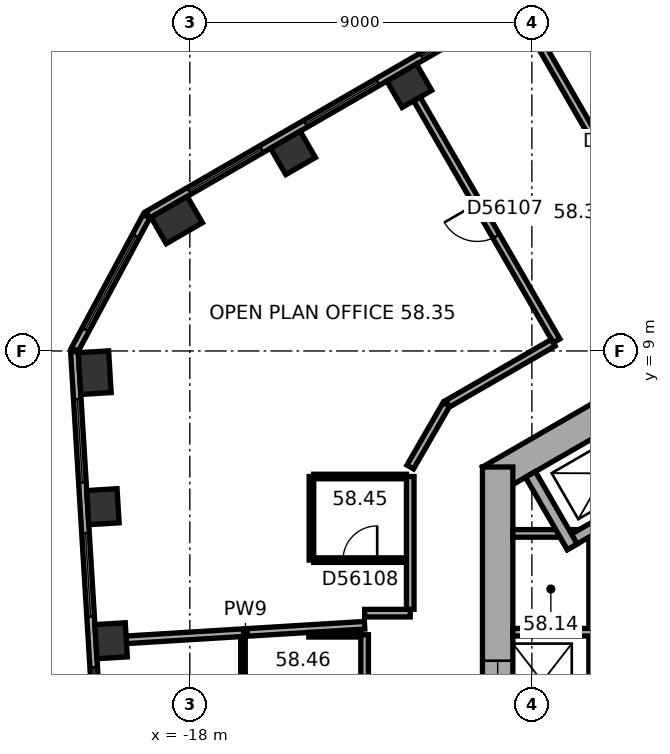
"""IFC4 building model, lengths in metres.
Left out: names, types, materials, properties, quantities, classifications, styles, units other than length and angle.
Written with IfcOpenShell. Run it as: python <this file> out.ifc"""

import sys

from ifc_helpers import new_model, si_unit, direction, frame, frame_2d, origin, origin_2d, place, context, subcontext, project, spatial, rectangle, extrude, element, fill, save


model = new_model("IFC4")
c1 = context("Model", 3, precision=1e-05, world=origin(), true_north=direction((0.0, 1.0)))
c2 = subcontext(c1, "Body", "Model", "MODEL_VIEW")
j1 = project(units=[si_unit("LENGTHUNIT", "METRE"), si_unit("PLANEANGLEUNIT", "RADIAN")], contexts=[c1])
p1 = place(None, origin())
s1 = spatial("IfcSite", under=j1, at=p1, CompositionType="ELEMENT")
p2 = place(p1, origin())
s2 = spatial("IfcBuilding", under=s1, at=p2, CompositionType="ELEMENT")
p3 = place(p2, frame((0.0, 0.0, 236.5)))
s3 = spatial("IfcBuildingStorey", under=s2, at=p3, CompositionType="ELEMENT", Elevation=236.5)
for number, where, z_axis, x_axis in (
    (1, (-12.225, 15.978, 0.0), (0.0, 0.0, 1.0), (-0.866, -0.5, 0.0)),
    (2, (-15.285, 14.211, 0.0), (0.0, 0.0, 1.0), (-0.866, -0.5, 0.0)),
):
    element("IfcColumn", number, at=place(p3, frame(where, z_axis=z_axis, x_axis=x_axis)), inside=s3, PredefinedType="COLUMN", context=c2, shape_type="SweptSolid", body=[
        extrude(rectangle(XDim=0.9, YDim=0.8, at=origin_2d()), origin(), (0.0, 0.0, 1.0), 3.7),
    ])
for number, where, z_axis, x_axis in (
    (3, (-18.345, 12.445, 0.0), (0.0, 0.0, 1.0), (-0.866, -0.5, 0.0)),
    (4, (-20.503, 8.429, 0.0), (0.0, 0.0, 1.0), (0.061, -0.998, 0.0)),
):
    element("IfcColumn", number, at=place(p3, frame(where, z_axis=z_axis, x_axis=x_axis)), inside=s3, PredefinedType="COLUMN", context=c2, shape_type="SweptSolid", body=[
        extrude(rectangle(XDim=1.1, YDim=0.8, at=origin_2d()), origin(), (0.0, 0.0, 1.0), 3.7),
    ])
for number, where, z_axis, x_axis in (
    (5, (-20.287, 4.902, 0.0), (0.0, 0.0, 1.0), (0.061, -0.998, 0.0)),
    (6, (-20.071, 1.375, 0.0), (0.0, 0.0, 1.0), (0.061, -0.998, 0.0)),
):
    element("IfcColumn", number, at=place(p3, frame(where, z_axis=z_axis, x_axis=x_axis)), inside=s3, PredefinedType="COLUMN", context=c2, shape_type="SweptSolid", body=[
        extrude(rectangle(XDim=0.9, YDim=0.8, at=origin_2d()), origin(), (0.0, 0.0, 1.0), 3.7),
    ])
p4 = place(p3, frame((0.2, 11.547, 0.0), z_axis=(0.0, 0.0, 1.0), x_axis=(-0.866023897231, -0.500002609418, 0.0)))
e7 = element("IfcWall", 7, at=p4, inside=s3, PredefinedType="SHEAR", context=c2, shape_type="SweptSolid", body=[
    extrude(rectangle(XDim=11.894, YDim=0.8, at=frame_2d((5.947, 0.0))), origin(), (0.0, 0.0, 1.0), 3.7),
])
p5 = place(p4, frame((6.147, 0.0, 0.0)))
e8 = element("IfcOpeningElement", 8, at=p5, cuts=e7, PredefinedType="OPENING", context=c2, shape_type="SweptSolid", body=[
    extrude(rectangle(XDim=1.5, YDim=2.1, at=frame_2d((0.75, 1.05))), frame((0.0, 0.41, 0.0), z_axis=(0.0, -1.0, 0.0), x_axis=(1.0, 0.0, 0.0)), (0.0, 0.0, 1.0), 0.82),
])
p6 = place(p4, frame((2.997, 0.0, 0.0)))
e9 = element("IfcOpeningElement", 9, at=p6, cuts=e7, PredefinedType="OPENING", context=c2, shape_type="SweptSolid", body=[
    extrude(rectangle(XDim=0.9, YDim=2.1, at=frame_2d((0.45, 1.05))), frame((0.0, 0.41, 0.0), z_axis=(0.0, -1.0, 0.0), x_axis=(1.0, 0.0, 0.0)), (0.0, 0.0, 1.0), 0.82),
])
p7 = place(p3, frame((-9.9, 5.947, 0.0), z_axis=(0.0, 0.0, 1.0), x_axis=(0.0, -1.0, 0.0)))
e10 = element("IfcWall", 10, at=p7, inside=s3, PredefinedType="SHEAR", context=c2, shape_type="SweptSolid", body=[
    extrude(rectangle(XDim=11.894, YDim=0.8, at=frame_2d((5.947, 0.0))), origin(), (0.0, 0.0, 1.0), 3.7),
])
p8 = place(p7, frame((5.097, 0.0, 0.0)))
e11 = element("IfcOpeningElement", 11, at=p8, cuts=e10, PredefinedType="OPENING", context=c2, shape_type="SweptSolid", body=[
    extrude(rectangle(XDim=1.1, YDim=2.1, at=frame_2d((0.55, 1.05))), frame((0.0, 0.41, 0.0), z_axis=(0.0, -1.0, 0.0), x_axis=(1.0, 0.0, 0.0)), (0.0, 0.0, 1.0), 0.82),
])
p9 = place(p7, frame((7.697, 0.0, 0.0)))
e12 = element("IfcOpeningElement", 12, at=p9, cuts=e10, PredefinedType="OPENING", context=c2, shape_type="SweptSolid", body=[
    extrude(rectangle(XDim=1.1, YDim=2.1, at=frame_2d((0.55, 1.05))), frame((0.0, 0.41, 0.0), z_axis=(0.0, -1.0, 0.0), x_axis=(1.0, 0.0, 0.0)), (0.0, 0.0, 1.0), 0.82),
])
p10 = place(p3, frame((-2.786, 22.005, 0.0), z_axis=(0.0, 0.0, 1.0), x_axis=(-0.866026555358, -0.49999800541, 0.0)))
e13 = element("IfcWall", 13, at=p10, inside=s3, PredefinedType="STANDARD", context=c2, shape_type="SweptSolid", body=[
    extrude(rectangle(XDim=18.841, YDim=0.2, at=frame_2d((9.421, 0.0))), origin(), (0.0, 0.0, 1.0), 3.7),
])
p11 = place(p10, frame((1.254, 0.0, 0.9)))
e14 = element("IfcOpeningElement", 14, at=p11, cuts=e13, PredefinedType="OPENING", context=c2, shape_type="SweptSolid", body=[
    extrude(rectangle(XDim=2.2, YDim=2.0, at=frame_2d((1.1, 1.0))), frame((0.0, 0.11, 0.0), z_axis=(0.0, -1.0, 0.0), x_axis=(1.0, 0.0, 0.0)), (0.0, 0.0, 1.0), 0.22),
])
p12 = place(p10, frame((4.788, 0.0, 0.9)))
e15 = element("IfcOpeningElement", 15, at=p12, cuts=e13, PredefinedType="OPENING", context=c2, shape_type="SweptSolid", body=[
    extrude(rectangle(XDim=2.2, YDim=2.0, at=frame_2d((1.1, 1.0))), frame((0.0, 0.11, 0.0), z_axis=(0.0, -1.0, 0.0), x_axis=(1.0, 0.0, 0.0)), (0.0, 0.0, 1.0), 0.22),
])
p13 = place(p10, frame((8.321, 0.0, 0.9)))
e16 = element("IfcOpeningElement", 16, at=p13, cuts=e13, PredefinedType="OPENING", context=c2, shape_type="SweptSolid", body=[
    extrude(rectangle(XDim=2.2, YDim=2.0, at=frame_2d((1.1, 1.0))), frame((0.0, 0.11, 0.0), z_axis=(0.0, -1.0, 0.0), x_axis=(1.0, 0.0, 0.0)), (0.0, 0.0, 1.0), 0.22),
])
p14 = place(p10, frame((11.855, 0.0, 0.9)))
e17 = element("IfcOpeningElement", 17, at=p14, cuts=e13, PredefinedType="OPENING", context=c2, shape_type="SweptSolid", body=[
    extrude(rectangle(XDim=2.2, YDim=2.0, at=frame_2d((1.1, 1.0))), frame((0.0, 0.11, 0.0), z_axis=(0.0, -1.0, 0.0), x_axis=(1.0, 0.0, 0.0)), (0.0, 0.0, 1.0), 0.22),
])
p15 = place(p10, frame((15.389, 0.0, 0.9)))
e18 = element("IfcOpeningElement", 18, at=p15, cuts=e13, PredefinedType="OPENING", context=c2, shape_type="SweptSolid", body=[
    extrude(rectangle(XDim=2.2, YDim=2.0, at=frame_2d((1.1, 1.0))), frame((0.0, 0.11, 0.0), z_axis=(0.0, -1.0, 0.0), x_axis=(1.0, 0.0, 0.0)), (0.0, 0.0, 1.0), 0.22),
])
p16 = place(p3, frame((-19.141, 12.545, 0.0), z_axis=(0.0, 0.0, 1.0), x_axis=(-0.473306370921, -0.880897882416, 0.0)))
e19 = element("IfcWall", 19, at=p16, inside=s3, PredefinedType="STANDARD", context=c2, shape_type="SweptSolid", body=[
    extrude(rectangle(XDim=3.983, YDim=0.2, at=frame_2d((1.991, 0.0))), origin(), (0.0, 0.0, 1.0), 3.7),
])
p17 = place(p16, frame((0.591, 0.0, 0.9)))
e20 = element("IfcOpeningElement", 20, at=p17, cuts=e19, PredefinedType="OPENING", context=c2, shape_type="SweptSolid", body=[
    extrude(rectangle(XDim=2.8, YDim=2.0, at=frame_2d((1.4, 1.0))), frame((0.0, 0.11, 0.0), z_axis=(0.0, -1.0, 0.0), x_axis=(1.0, 0.0, 0.0)), (0.0, 0.0, 1.0), 0.22),
])
p18 = place(p3, frame((-21.038, 8.984, 0.0), z_axis=(0.0, 0.0, 1.0), x_axis=(0.061043935634, -0.998135079998, 0.0)))
e21 = element("IfcWall", 21, at=p18, inside=s3, PredefinedType="STANDARD", context=c2, shape_type="SweptSolid", body=[
    extrude(rectangle(XDim=18.841, YDim=0.2, at=frame_2d((9.421, 0.0))), origin(), (0.0, 0.0, 1.0), 3.7),
])
p19 = place(p18, frame((1.253, 0.0, 0.9)))
e22 = element("IfcOpeningElement", 22, at=p19, cuts=e21, PredefinedType="OPENING", context=c2, shape_type="SweptSolid", body=[
    extrude(rectangle(XDim=2.2, YDim=2.0, at=frame_2d((1.1, 1.0))), frame((0.0, 0.11, 0.0), z_axis=(0.0, -1.0, 0.0), x_axis=(1.0, 0.0, 0.0)), (0.0, 0.0, 1.0), 0.22),
])
p20 = place(p18, frame((4.786, 0.0, 0.9)))
e23 = element("IfcOpeningElement", 23, at=p20, cuts=e21, PredefinedType="OPENING", context=c2, shape_type="SweptSolid", body=[
    extrude(rectangle(XDim=2.2, YDim=2.0, at=frame_2d((1.1, 1.0))), frame((0.0, 0.11, 0.0), z_axis=(0.0, -1.0, 0.0), x_axis=(1.0, 0.0, 0.0)), (0.0, 0.0, 1.0), 0.22),
])
p21 = place(p18, frame((8.32, 0.0, 0.9)))
e24 = element("IfcOpeningElement", 24, at=p21, cuts=e21, PredefinedType="OPENING", context=c2, shape_type="SweptSolid", body=[
    extrude(rectangle(XDim=2.2, YDim=2.0, at=frame_2d((1.1, 1.0))), frame((0.0, 0.11, 0.0), z_axis=(0.0, -1.0, 0.0), x_axis=(1.0, 0.0, 0.0)), (0.0, 0.0, 1.0), 0.22),
])
p22 = place(p18, frame((11.854, 0.0, 0.9)))
e25 = element("IfcOpeningElement", 25, at=p22, cuts=e21, PredefinedType="OPENING", context=c2, shape_type="SweptSolid", body=[
    extrude(rectangle(XDim=2.2, YDim=2.0, at=frame_2d((1.1, 1.0))), frame((0.0, 0.11, 0.0), z_axis=(0.0, -1.0, 0.0), x_axis=(1.0, 0.0, 0.0)), (0.0, 0.0, 1.0), 0.22),
])
p23 = place(p18, frame((15.387, 0.0, 0.9)))
e26 = element("IfcOpeningElement", 26, at=p23, cuts=e21, PredefinedType="OPENING", context=c2, shape_type="SweptSolid", body=[
    extrude(rectangle(XDim=2.2, YDim=2.0, at=frame_2d((1.1, 1.0))), frame((0.0, 0.11, 0.0), z_axis=(0.0, -1.0, 0.0), x_axis=(1.0, 0.0, 0.0)), (0.0, 0.0, 1.0), 0.22),
])
p24 = place(p3, frame((-7.4, 4.3, 0.0), z_axis=(0.0, 0.0, 1.0), x_axis=(0.0, -1.0, 0.0)))
e27 = element("IfcWall", 27, at=p24, inside=s3, PredefinedType="PARTITIONING", context=c2, shape_type="SweptSolid", body=[
    extrude(rectangle(XDim=8.0, YDim=0.2, at=frame_2d((4.0, 0.0))), origin(), (0.0, 0.0, 1.0), 3.42),
])
for number, where, z_axis, x_axis in (
    (28, (-7.3, 4.2, 0.0), (0.0, 0.0, 1.0), (-1.0, 0.0, 0.0)),
    (29, (-7.3, 1.6, 0.0), (0.0, 0.0, 1.0), (-1.0, 0.0, 0.0)),
):
    element("IfcWall", number, at=place(p3, frame(where, z_axis=z_axis, x_axis=x_axis)), inside=s3, PredefinedType="PARTITIONING", context=c2, shape_type="SweptSolid", body=[
        extrude(rectangle(XDim=2.2, YDim=0.2, at=frame_2d((1.1, 0.0))), origin(), (0.0, 0.0, 1.0), 3.42),
    ])
p25 = place(p3, frame((-5.24, 5.577, 0.0), z_axis=(0.0, 0.0, 1.0), x_axis=(-0.866014461049, -0.500018952895, 0.0)))
e30 = element("IfcWall", 30, at=p25, inside=s3, PredefinedType="SHEAR", context=c2, shape_type="SweptSolid", body=[
    extrude(rectangle(XDim=3.35, YDim=0.3, at=frame_2d((1.675, 0.0))), origin(), (0.0, 0.0, 1.0), 3.42),
])
p26 = place(p3, frame((-7.937, 3.847, 0.0), z_axis=(0.0, 0.0, 1.0), x_axis=(-0.50002983664, 0.866008176907, 0.0)))
e31 = element("IfcWall", 31, at=p26, inside=s3, PredefinedType="SHEAR", context=c2, shape_type="SweptSolid", body=[
    extrude(rectangle(XDim=2.2, YDim=0.3, at=frame_2d((1.1, 0.0))), origin(), (0.0, 0.0, 1.0), 3.42),
])
p27 = place(p3, frame((-19.672, 1.4, 0.0), z_axis=(0.0, 0.0, 1.0), x_axis=(0.99813499784, 0.061045278997, 0.0)))
e32 = element("IfcWall", 32, at=p27, inside=s3, PredefinedType="PARTITIONING", context=c2, shape_type="SweptSolid", body=[
    extrude(rectangle(XDim=6.283, YDim=0.2, at=frame_2d((3.142, 0.0))), origin(), (0.0, 0.0, 1.0), 2.87),
])
p28 = place(p3, frame((-16.601, -1.267, 0.0), z_axis=(0.0, 0.0, 1.0), x_axis=(0.0, 1.0, 0.0)))
e33 = element("IfcWall", 33, at=p28, inside=s3, PredefinedType="PARTITIONING", context=c2, shape_type="SweptSolid", body=[
    extrude(rectangle(XDim=2.75, YDim=0.12, at=frame_2d((1.375, 0.0))), origin(), (0.0, 0.0, 1.0), 3.42),
])
p29 = place(p3, frame((-14.869, 1.533, 0.0), z_axis=(0.0, 0.0, 1.0), x_axis=(1.0, 0.0, 0.0)))
e34 = element("IfcWall", 34, at=p29, inside=s3, PredefinedType="PARTITIONING", context=c2, shape_type="SweptSolid", body=[
    extrude(rectangle(XDim=1.368, YDim=0.12, at=frame_2d((0.684, 0.0))), origin(), (0.0, 0.0, 1.0), 3.42),
])
p30 = place(p3, frame((-14.8, 3.497, 0.0), z_axis=(0.0, 0.0, 1.0), x_axis=(0.0, 1.0, 0.0)))
e35 = element("IfcWall", 35, at=p30, inside=s3, PredefinedType="PARTITIONING", context=c2, shape_type="SweptSolid", body=[
    extrude(rectangle(XDim=2.2, YDim=0.12, at=frame_2d((1.1, 0.0))), origin(), (0.0, 0.0, 1.0), 3.42),
])
p31 = place(p3, frame((-14.74, 5.697, 0.0), z_axis=(0.0, 0.0, 1.0), x_axis=(1.0, 0.0, 0.0)))
e36 = element("IfcWall", 36, at=p31, inside=s3, PredefinedType="PARTITIONING", context=c2, shape_type="SweptSolid", body=[
    extrude(rectangle(XDim=2.44, YDim=0.12, at=frame_2d((1.22, 0.0))), origin(), (0.0, 0.0, 1.0), 3.42),
])
p32 = place(p3, frame((-13.401, 1.533, 0.0), z_axis=(0.0, 0.0, 1.0), x_axis=(0.0, -1.0, 0.0)))
e37 = element("IfcWall", 37, at=p32, inside=s3, PredefinedType="PARTITIONING", context=c2, shape_type="SweptSolid", body=[
    extrude(rectangle(XDim=5.534, YDim=0.2, at=frame_2d((2.767, 0.0))), origin(), (0.0, 0.0, 1.0), 3.42),
])
p33 = place(p32, frame((3.692, 0.0, 0.0)))
e38 = element("IfcOpeningElement", 38, at=p33, cuts=e37, PredefinedType="OPENING", context=c2, shape_type="SweptSolid", body=[
    extrude(rectangle(XDim=1.0, YDim=2.1, at=frame_2d((0.5, 1.05))), frame((0.0, 0.11, 0.0), z_axis=(0.0, -1.0, 0.0), x_axis=(1.0, 0.0, 0.0)), (0.0, 0.0, 1.0), 0.22),
])
p34 = place(p3, frame((-12.3, 3.497, 0.0), z_axis=(0.0, 0.0, 1.0), x_axis=(-1.0, 0.0, 0.0)))
e39 = element("IfcWall", 39, at=p34, inside=s3, PredefinedType="PARTITIONING", context=c2, shape_type="SweptSolid", body=[
    extrude(rectangle(XDim=2.44, YDim=0.12, at=frame_2d((1.22, 0.0))), origin(), (0.0, 0.0, 1.0), 3.42),
])
p35 = place(p34, frame((0.77, 0.0, 0.0)))
e40 = element("IfcOpeningElement", 40, at=p35, cuts=e39, PredefinedType="OPENING", context=c2, shape_type="SweptSolid", body=[
    extrude(rectangle(XDim=0.9, YDim=2.1, at=frame_2d((0.45, 1.05))), frame((0.0, 0.07, 0.0), z_axis=(0.0, -1.0, 0.0), x_axis=(1.0, 0.0, 0.0)), (0.0, 0.0, 1.0), 0.14),
])
p36 = place(p3, frame((-12.2, 2.101, 0.0), z_axis=(0.0, 0.0, 1.0), x_axis=(-1.0, 0.0, 0.0)))
e41 = element("IfcWall", 41, at=p36, inside=s3, PredefinedType="PARTITIONING", context=c2, shape_type="SweptSolid", body=[
    extrude(rectangle(XDim=1.201, YDim=0.2, at=frame_2d((0.601, 0.0))), origin(), (0.0, 0.0, 1.0), 3.42),
])
p37 = place(p3, frame((-12.2, 5.697, 0.0), z_axis=(0.0, 0.0, 1.0), x_axis=(0.0, -1.0, 0.0)))
e42 = element("IfcWall", 42, at=p37, inside=s3, PredefinedType="PARTITIONING", context=c2, shape_type="SweptSolid", body=[
    extrude(rectangle(XDim=3.496, YDim=0.2, at=frame_2d((1.748, 0.0))), origin(), (0.0, 0.0, 1.0), 3.42),
])
p38 = place(p3, frame((-12.025, 15.632, 0.0), z_axis=(0.0, 0.0, 1.0), x_axis=(0.499983153418, -0.866035129944, 0.0)))
e43 = element("IfcWall", 43, at=p38, inside=s3, PredefinedType="PARTITIONING", context=c2, shape_type="SweptSolid", body=[
    extrude(rectangle(XDim=7.35, YDim=0.2, at=frame_2d((3.675, 0.0))), origin(), (0.0, 0.0, 1.0), 3.42),
])
p39 = place(p38, frame((3.175, 0.0, 0.0)))
e44 = element("IfcOpeningElement", 44, at=p39, cuts=e43, PredefinedType="OPENING", context=c2, shape_type="SweptSolid", body=[
    extrude(rectangle(XDim=1.0, YDim=2.1, at=frame_2d((0.5, 1.05))), frame((0.0, 0.11, 0.0), z_axis=(0.0, -1.0, 0.0), x_axis=(1.0, 0.0, 0.0)), (0.0, 0.0, 1.0), 0.22),
])
p40 = place(p3, frame((-11.25, 7.592, 0.0), z_axis=(0.0, 0.0, 1.0), x_axis=(-0.500022797313, -0.86601224135, 0.0)))
e45 = element("IfcWall", 45, at=p40, inside=s3, PredefinedType="PARTITIONING", context=c2, shape_type="SweptSolid", body=[
    extrude(rectangle(XDim=1.9, YDim=0.2, at=frame_2d((0.95, 0.0))), origin(), (0.0, 0.0, 1.0), 3.42),
])
p41 = place(p3, frame((-8.965, 17.399, 0.0), z_axis=(0.0, 0.0, 1.0), x_axis=(0.499993683172, -0.866029050776, 0.0)))
e46 = element("IfcWall", 46, at=p41, inside=s3, PredefinedType="PARTITIONING", context=c2, shape_type="SweptSolid", body=[
    extrude(rectangle(XDim=7.35, YDim=0.2, at=frame_2d((3.675, 0.0))), origin(), (0.0, 0.0, 1.0), 2.87),
])
p42 = place(p41, frame((3.175, 0.0, 0.0)))
e47 = element("IfcOpeningElement", 47, at=p42, cuts=e46, PredefinedType="OPENING", context=c2, shape_type="SweptSolid", body=[
    extrude(rectangle(XDim=1.0, YDim=2.1, at=frame_2d((0.5, 1.05))), frame((0.0, 0.11, 0.0), z_axis=(0.0, -1.0, 0.0), x_axis=(1.0, 0.0, 0.0)), (0.0, 0.0, 1.0), 0.22),
])
p43 = place(p3, frame((-8.437, 9.217, 0.0), z_axis=(0.0, 0.0, 1.0), x_axis=(-0.866005660673, -0.500034194513, 0.0)))
e48 = element("IfcWall", 48, at=p43, inside=s3, PredefinedType="PARTITIONING", context=c2, shape_type="SweptSolid", body=[
    extrude(rectangle(XDim=3.209, YDim=0.2, at=frame_2d((1.604, 0.0))), origin(), (0.0, 0.0, 1.0), 3.42),
])
p44 = place(p13, origin())
e49 = element("IfcWindow", 49, at=p44, inside=s3, PartitioningType="SINGLE_PANEL", PredefinedType="WINDOW", context=c2, shape_type="SweptSolid", body=[
    extrude(rectangle(XDim=2.2, YDim=2.0, at=frame_2d((1.1, 1.0))), frame((0.0, 0.03, 0.0), z_axis=(0.0, -1.0, 0.0), x_axis=(1.0, 0.0, 0.0)), (0.0, 0.0, 1.0), 0.06),
])
fill(e16, e49)
p45 = place(p14, origin())
e50 = element("IfcWindow", 50, at=p45, inside=s3, PartitioningType="SINGLE_PANEL", PredefinedType="WINDOW", context=c2, shape_type="SweptSolid", body=[
    extrude(rectangle(XDim=2.2, YDim=2.0, at=frame_2d((1.1, 1.0))), frame((0.0, 0.03, 0.0), z_axis=(0.0, -1.0, 0.0), x_axis=(1.0, 0.0, 0.0)), (0.0, 0.0, 1.0), 0.06),
])
fill(e17, e50)
p46 = place(p15, origin())
e51 = element("IfcWindow", 51, at=p46, inside=s3, PartitioningType="SINGLE_PANEL", PredefinedType="WINDOW", context=c2, shape_type="SweptSolid", body=[
    extrude(rectangle(XDim=2.2, YDim=2.0, at=frame_2d((1.1, 1.0))), frame((0.0, 0.03, 0.0), z_axis=(0.0, -1.0, 0.0), x_axis=(1.0, 0.0, 0.0)), (0.0, 0.0, 1.0), 0.06),
])
fill(e18, e51)
p47 = place(p17, origin())
e52 = element("IfcWindow", 52, at=p47, inside=s3, PartitioningType="SINGLE_PANEL", PredefinedType="WINDOW", context=c2, shape_type="SweptSolid", body=[
    extrude(rectangle(XDim=2.8, YDim=2.0, at=frame_2d((1.4, 1.0))), frame((0.0, 0.03, 0.0), z_axis=(0.0, -1.0, 0.0), x_axis=(1.0, 0.0, 0.0)), (0.0, 0.0, 1.0), 0.06),
])
fill(e20, e52)
p48 = place(p19, origin())
e53 = element("IfcWindow", 53, at=p48, inside=s3, PartitioningType="SINGLE_PANEL", PredefinedType="WINDOW", context=c2, shape_type="SweptSolid", body=[
    extrude(rectangle(XDim=2.2, YDim=2.0, at=frame_2d((1.1, 1.0))), frame((0.0, 0.03, 0.0), z_axis=(0.0, -1.0, 0.0), x_axis=(1.0, 0.0, 0.0)), (0.0, 0.0, 1.0), 0.06),
])
fill(e22, e53)
p49 = place(p20, origin())
e54 = element("IfcWindow", 54, at=p49, inside=s3, PartitioningType="SINGLE_PANEL", PredefinedType="WINDOW", context=c2, shape_type="SweptSolid", body=[
    extrude(rectangle(XDim=2.2, YDim=2.0, at=frame_2d((1.1, 1.0))), frame((0.0, 0.03, 0.0), z_axis=(0.0, -1.0, 0.0), x_axis=(1.0, 0.0, 0.0)), (0.0, 0.0, 1.0), 0.06),
])
fill(e23, e54)
p50 = place(p21, origin())
e55 = element("IfcWindow", 55, at=p50, inside=s3, PartitioningType="SINGLE_PANEL", PredefinedType="WINDOW", context=c2, shape_type="SweptSolid", body=[
    extrude(rectangle(XDim=2.2, YDim=2.0, at=frame_2d((1.1, 1.0))), frame((0.0, 0.03, 0.0), z_axis=(0.0, -1.0, 0.0), x_axis=(1.0, 0.0, 0.0)), (0.0, 0.0, 1.0), 0.06),
])
fill(e24, e55)
p51 = place(p8, origin())
e56 = element("IfcDoor", 56, at=p51, inside=s3, OperationType="DOUBLE_DOOR_SLIDING", PredefinedType="DOOR", context=c2, shape_type="SweptSolid", body=[
    extrude(rectangle(XDim=1.1, YDim=2.1, at=frame_2d((0.55, 1.05))), frame((0.0, 0.025, 0.0), z_axis=(0.0, -1.0, 0.0), x_axis=(1.0, 0.0, 0.0)), (0.0, 0.0, 1.0), 0.05),
])
fill(e11, e56)
p52 = place(p39, origin())
e57 = element("IfcDoor", 57, at=p52, inside=s3, OperationType="SINGLE_SWING_LEFT", PredefinedType="DOOR", context=c2, shape_type="SweptSolid", body=[
    extrude(rectangle(XDim=1.0, YDim=2.1, at=frame_2d((0.5, 1.05))), frame((0.0, 0.025, 0.0), z_axis=(0.0, -1.0, 0.0), x_axis=(1.0, 0.0, 0.0)), (0.0, 0.0, 1.0), 0.05),
])
fill(e44, e57)
p53 = place(p35, origin())
e58 = element("IfcDoor", 58, at=p53, inside=s3, OperationType="SINGLE_SWING_LEFT", PredefinedType="DOOR", context=c2, shape_type="SweptSolid", body=[
    extrude(rectangle(XDim=0.9, YDim=2.1, at=frame_2d((0.45, 1.05))), frame((0.0, 0.025, 0.0), z_axis=(0.0, -1.0, 0.0), x_axis=(1.0, 0.0, 0.0)), (0.0, 0.0, 1.0), 0.05),
])
fill(e40, e58)
save(model, sys.argv[1])
